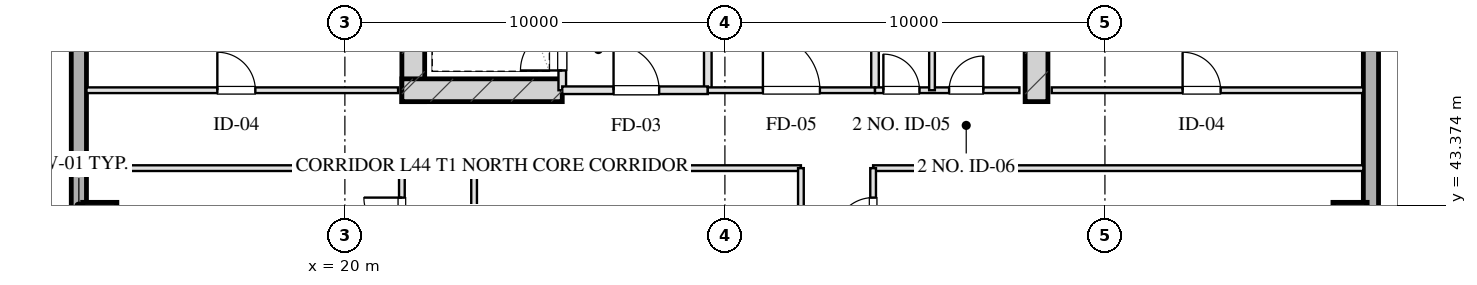
"""IFC4 building model, lengths in metres.
Left out: names, types, materials, properties, quantities, classifications, styles, units other than length and angle.
Written with IfcOpenShell. Run it as: python <this file> out.ifc"""

import sys

from ifc_helpers import new_model, si_unit, direction, frame, frame_2d, origin, origin_2d, place, context, subcontext, project, spatial, rectangle, hollow_rectangle, extrude, element, fill, save


model = new_model("IFC4")
c1 = context("Model", 3, precision=1e-05, world=origin(), true_north=direction((0.0, 1.0)))
c2 = subcontext(c1, "Body", "Model", "MODEL_VIEW")
j1 = project(units=[si_unit("LENGTHUNIT", "METRE"), si_unit("PLANEANGLEUNIT", "RADIAN")], contexts=[c1])
p1 = place(None, origin())
s1 = spatial("IfcSite", under=j1, at=p1, CompositionType="ELEMENT")
p2 = place(p1, origin())
s2 = spatial("IfcBuilding", under=s1, at=p2, CompositionType="ELEMENT")
p3 = place(p2, frame((0.0, 0.0, 166.75)))
s3 = spatial("IfcBuildingStorey", under=s2, at=p3, CompositionType="ELEMENT", Elevation=166.75)
for number, where, z_axis, x_axis in (
    (1, (21.8, 46.1, 0.0), (0.0, 0.0, 1.0), (0.0, 1.0, 0.0)),
    (2, (38.2, 46.1, 0.0), (0.0, 0.0, 1.0), (0.0, 1.0, 0.0)),
):
    element("IfcWall", number, at=place(p3, frame(where, z_axis=z_axis, x_axis=x_axis)), inside=s3, PredefinedType="SHEAR", context=c2, shape_type="SweptSolid", body=[
        extrude(rectangle(XDim=9.48, YDim=0.6, at=frame_2d((4.74, 0.0))), origin(), (0.0, 0.0, 1.0), 3.45),
    ])
p4 = place(p3, frame((21.5, 46.4, 0.0), z_axis=(0.0, 0.0, 1.0), x_axis=(1.0, 0.0, 0.0)))
e3 = element("IfcWall", 3, at=p4, inside=s3, PredefinedType="SHEAR", context=c2, shape_type="SweptSolid", body=[
    extrude(rectangle(XDim=4.22, YDim=0.6, at=frame_2d((2.11, 0.0))), origin(), (0.0, 0.0, 1.0), 3.45),
])
for number, where, z_axis, x_axis in (
    (4, (13.55, 43.0, 0.0), (0.0, 0.0, 1.0), (1.0, 0.0, 0.0)),
    (5, (46.45, 43.0, 0.0), (0.0, 0.0, 1.0), (1.0, 0.0, 0.0)),
):
    element("IfcColumn", number, at=place(p3, frame(where, z_axis=z_axis, x_axis=x_axis)), inside=s3, PredefinedType="COLUMN", context=c2, shape_type="SweptSolid", body=[
        extrude(hollow_rectangle(XDim=0.9, YDim=0.9, WallThickness=0.032, at=origin_2d()), origin(), (0.0, 0.0, 1.0), 3.451),
    ])
p5 = place(p3, frame((13.0, 10.8, 0.0), z_axis=(0.0, 0.0, 1.0), x_axis=(0.0, 1.0, 0.0)))
e6 = element("IfcWall", 6, at=p5, inside=s3, PredefinedType="SOLIDWALL", context=c2, shape_type="SweptSolid", body=[
    extrude(rectangle(XDim=46.4, YDim=0.4, at=frame_2d((23.2, 0.0))), origin(), (0.0, 0.0, 1.0), 2.61),
])
p6 = place(p5, frame((16.85, 0.0, 0.0)))
e7 = element("IfcOpeningElement", 7, at=p6, cuts=e6, PredefinedType="OPENING", context=c2, shape_type="SweptSolid", body=[
    extrude(rectangle(XDim=1.1, YDim=2.15, at=frame_2d((0.55, 1.075))), frame((0.0, 0.21, 0.0), z_axis=(0.0, -1.0, 0.0), x_axis=(1.0, 0.0, 0.0)), (0.0, 0.0, 1.0), 0.42),
])
p7 = place(p3, frame((47.0, 57.2, 0.0), z_axis=(0.0, 0.0, 1.0), x_axis=(0.0, -1.0, 0.0)))
e8 = element("IfcWall", 8, at=p7, inside=s3, PredefinedType="SOLIDWALL", context=c2, shape_type="SweptSolid", body=[
    extrude(rectangle(XDim=46.4, YDim=0.4, at=frame_2d((23.2, 0.0))), origin(), (0.0, 0.0, 1.0), 2.61),
])
p8 = place(p7, frame((25.596, 0.0, 0.0)))
e9 = element("IfcOpeningElement", 9, at=p8, cuts=e8, PredefinedType="OPENING", context=c2, shape_type="SweptSolid", body=[
    extrude(rectangle(XDim=1.1, YDim=2.15, at=frame_2d((0.55, 1.075))), frame((0.0, 0.21, 0.0), z_axis=(0.0, -1.0, 0.0), x_axis=(1.0, 0.0, 0.0)), (0.0, 0.0, 1.0), 0.42),
])
p9 = place(p3, frame((25.72, 46.4, 0.0), z_axis=(0.0, 0.0, 1.0), x_axis=(0.0, 1.0, 0.0)))
e10 = element("IfcWall", 10, at=p9, inside=s3, PredefinedType="PARTITIONING", context=c2, shape_type="SweptSolid", body=[
    extrude(rectangle(XDim=1.9, YDim=0.2, at=frame_2d((0.95, 0.0))), origin(), (0.0, 0.0, 1.0), 3.175),
])
p10 = place(p9, frame((0.52, 0.0, 0.0)))
e11 = element("IfcOpeningElement", 11, at=p10, cuts=e10, PredefinedType="OPENING", context=c2, shape_type="SweptSolid", body=[
    extrude(rectangle(XDim=1.1, YDim=2.05, at=frame_2d((0.55, 1.025))), frame((0.0, 0.11, 0.0), z_axis=(0.0, -1.0, 0.0), x_axis=(1.0, 0.0, 0.0)), (0.0, 0.0, 1.0), 0.22),
])
p11 = place(p3, frame((29.55, 46.4, 0.0), z_axis=(0.0, 0.0, 1.0), x_axis=(0.0, 1.0, 0.0)))
e12 = element("IfcWall", 12, at=p11, inside=s3, PredefinedType="PARTITIONING", context=c2, shape_type="SweptSolid", body=[
    extrude(rectangle(XDim=8.43, YDim=0.2, at=frame_2d((4.215, 0.0))), origin(), (0.0, 0.0, 1.0), 3.175),
])
p12 = place(p3, frame((25.72, 46.4, 0.0), z_axis=(0.0, 0.0, 1.0), x_axis=(1.0, 0.0, 0.0)))
e13 = element("IfcWall", 13, at=p12, inside=s3, PredefinedType="PARTITIONING", context=c2, shape_type="SweptSolid", body=[
    extrude(rectangle(XDim=3.83, YDim=0.2, at=frame_2d((1.915, 0.0))), origin(), (0.0, 0.0, 1.0), 3.175),
])
p13 = place(p12, frame((1.35, 0.0, 0.0)))
e14 = element("IfcOpeningElement", 14, at=p13, cuts=e13, PredefinedType="OPENING", context=c2, shape_type="SweptSolid", body=[
    extrude(rectangle(XDim=1.2, YDim=2.05, at=frame_2d((0.6, 1.025))), frame((0.0, 0.11, 0.0), z_axis=(0.0, -1.0, 0.0), x_axis=(1.0, 0.0, 0.0)), (0.0, 0.0, 1.0), 0.22),
])
p14 = place(p3, frame((33.95, 46.4, 0.0), z_axis=(0.0, 0.0, 1.0), x_axis=(0.0, 1.0, 0.0)))
e15 = element("IfcWall", 15, at=p14, inside=s3, PredefinedType="PARTITIONING", context=c2, shape_type="SweptSolid", body=[
    extrude(rectangle(XDim=8.43, YDim=0.2, at=frame_2d((4.215, 0.0))), origin(), (0.0, 0.0, 1.0), 3.175),
])
p15 = place(p3, frame((29.55, 46.4, 0.0), z_axis=(0.0, 0.0, 1.0), x_axis=(1.0, 0.0, 0.0)))
e16 = element("IfcWall", 16, at=p15, inside=s3, PredefinedType="PARTITIONING", context=c2, shape_type="SweptSolid", body=[
    extrude(rectangle(XDim=4.4, YDim=0.15, at=frame_2d((2.2, 0.0))), origin(), (0.0, 0.0, 1.0), 3.175),
])
p16 = place(p15, frame((1.45, 0.0, 0.0)))
e17 = element("IfcOpeningElement", 17, at=p16, cuts=e16, PredefinedType="OPENING", context=c2, shape_type="SweptSolid", body=[
    extrude(rectangle(XDim=1.5, YDim=2.05, at=frame_2d((0.75, 1.025))), frame((0.0, 0.085, 0.0), z_axis=(0.0, -1.0, 0.0), x_axis=(1.0, 0.0, 0.0)), (0.0, 0.0, 1.0), 0.17),
])
p17 = place(p3, frame((33.95, 46.4, 0.0), z_axis=(0.0, 0.0, 1.0), x_axis=(1.0, 0.0, 0.0)))
e18 = element("IfcWall", 18, at=p17, inside=s3, PredefinedType="PARTITIONING", context=c2, shape_type="SweptSolid", body=[
    extrude(rectangle(XDim=3.8, YDim=0.15, at=frame_2d((1.9, 0.0))), origin(), (0.0, 0.0, 1.0), 3.175),
])
p18 = place(p17, frame((0.22, 0.0, 0.0)))
e19 = element("IfcOpeningElement", 19, at=p18, cuts=e18, PredefinedType="OPENING", context=c2, shape_type="SweptSolid", body=[
    extrude(rectangle(XDim=0.95, YDim=2.05, at=frame_2d((0.475, 1.025))), frame((0.0, 0.085, 0.0), z_axis=(0.0, -1.0, 0.0), x_axis=(1.0, 0.0, 0.0)), (0.0, 0.0, 1.0), 0.17),
])
p19 = place(p17, frame((1.95, 0.0, 0.0)))
e20 = element("IfcOpeningElement", 20, at=p19, cuts=e18, PredefinedType="OPENING", context=c2, shape_type="SweptSolid", body=[
    extrude(rectangle(XDim=0.9, YDim=2.05, at=frame_2d((0.45, 1.025))), frame((0.0, 0.085, 0.0), z_axis=(0.0, -1.0, 0.0), x_axis=(1.0, 0.0, 0.0)), (0.0, 0.0, 1.0), 0.17),
])
p20 = place(p3, frame((35.45, 46.4, 0.0), z_axis=(0.0, 0.0, 1.0), x_axis=(0.0, 1.0, 0.0)))
e21 = element("IfcWall", 21, at=p20, inside=s3, PredefinedType="PARTITIONING", context=c2, shape_type="SweptSolid", body=[
    extrude(rectangle(XDim=8.43, YDim=0.15, at=frame_2d((4.215, 0.0))), origin(), (0.0, 0.0, 1.0), 2.765),
])
p21 = place(p20, frame((2.55, 0.0, 0.0)))
e22 = element("IfcOpeningElement", 22, at=p21, cuts=e21, PredefinedType="OPENING", context=c2, shape_type="SweptSolid", body=[
    extrude(rectangle(XDim=0.95, YDim=2.05, at=frame_2d((0.475, 1.025))), frame((0.0, 0.085, 0.0), z_axis=(0.0, -1.0, 0.0), x_axis=(1.0, 0.0, 0.0)), (0.0, 0.0, 1.0), 0.17),
])
p22 = place(p20, frame((5.6, 0.0, 0.0)))
e23 = element("IfcOpeningElement", 23, at=p22, cuts=e21, PredefinedType="OPENING", context=c2, shape_type="SweptSolid", body=[
    extrude(rectangle(XDim=0.9, YDim=2.05, at=frame_2d((0.45, 1.025))), frame((0.0, 0.085, 0.0), z_axis=(0.0, -1.0, 0.0), x_axis=(1.0, 0.0, 0.0)), (0.0, 0.0, 1.0), 0.17),
])
p23 = place(p3, frame((13.2, 46.4, 0.0), z_axis=(0.0, 0.0, 1.0), x_axis=(1.0, 0.0, 0.0)))
e24 = element("IfcWall", 24, at=p23, inside=s3, PredefinedType="PARTITIONING", context=c2, shape_type="SweptSolid", body=[
    extrude(rectangle(XDim=8.2, YDim=0.15, at=frame_2d((4.1, 0.0))), origin(), (0.0, 0.0, 1.0), 3.175),
])
p24 = place(p23, frame((3.444, 0.0, 0.0)))
e25 = element("IfcOpeningElement", 25, at=p24, cuts=e24, PredefinedType="OPENING", context=c2, shape_type="SweptSolid", body=[
    extrude(rectangle(XDim=1.0, YDim=2.05, at=frame_2d((0.5, 1.025))), frame((0.0, 0.085, 0.0), z_axis=(0.0, -1.0, 0.0), x_axis=(1.0, 0.0, 0.0)), (0.0, 0.0, 1.0), 0.17),
])
p25 = place(p3, frame((38.6, 46.4, 0.0), z_axis=(0.0, 0.0, 1.0), x_axis=(1.0, 0.0, 0.0)))
e26 = element("IfcWall", 26, at=p25, inside=s3, PredefinedType="PARTITIONING", context=c2, shape_type="SweptSolid", body=[
    extrude(rectangle(XDim=8.2, YDim=0.15, at=frame_2d((4.1, 0.0))), origin(), (0.0, 0.0, 1.0), 3.175),
])
p26 = place(p25, frame((3.444, 0.0, 0.0)))
e27 = element("IfcOpeningElement", 27, at=p26, cuts=e26, PredefinedType="OPENING", context=c2, shape_type="SweptSolid", body=[
    extrude(rectangle(XDim=1.0, YDim=2.05, at=frame_2d((0.5, 1.025))), frame((0.0, 0.085, 0.0), z_axis=(0.0, -1.0, 0.0), x_axis=(1.0, 0.0, 0.0)), (0.0, 0.0, 1.0), 0.17),
])
p27 = place(p3, frame((13.2, 44.35, 0.0), z_axis=(0.0, 0.0, 1.0), x_axis=(1.0, 0.0, 0.0)))
e28 = element("IfcWall", 28, at=p27, inside=s3, PredefinedType="PARTITIONING", context=c2, shape_type="SweptSolid", body=[
    extrude(rectangle(XDim=8.3, YDim=0.15, at=frame_2d((4.15, 0.0))), origin(), (0.0, 0.0, 1.0), 3.175),
])
p28 = place(p3, frame((23.4, 44.35, 0.0), z_axis=(0.0, 0.0, 1.0), x_axis=(1.0, 0.0, 0.0)))
e29 = element("IfcWall", 29, at=p28, inside=s3, PredefinedType="PARTITIONING", context=c2, shape_type="SweptSolid", body=[
    extrude(rectangle(XDim=8.6, YDim=0.15, at=frame_2d((4.3, 0.0))), origin(), (0.0, 0.0, 1.0), 3.175),
])
p29 = place(p3, frame((33.9, 44.35, 0.0), z_axis=(0.0, 0.0, 1.0), x_axis=(1.0, 0.0, 0.0)))
e30 = element("IfcWall", 30, at=p29, inside=s3, PredefinedType="PARTITIONING", context=c2, shape_type="SweptSolid", body=[
    extrude(rectangle(XDim=12.9, YDim=0.15, at=frame_2d((6.45, 0.0))), origin(), (0.0, 0.0, 1.0), 3.175),
])
p30 = place(p3, frame((21.5, 23.65, 0.0), z_axis=(0.0, 0.0, 1.0), x_axis=(0.0, 1.0, 0.0)))
e31 = element("IfcWall", 31, at=p30, inside=s3, PredefinedType="PARTITIONING", context=c2, shape_type="SweptSolid", body=[
    extrude(rectangle(XDim=20.7, YDim=0.15, at=frame_2d((10.35, 0.0))), origin(), (0.0, 0.0, 1.0), 3.175),
])
p31 = place(p30, frame((0.775, 0.0, 0.0)))
e32 = element("IfcOpeningElement", 32, at=p31, cuts=e31, PredefinedType="OPENING", context=c2, shape_type="SweptSolid", body=[
    extrude(rectangle(XDim=1.0, YDim=2.05, at=frame_2d((0.5, 1.025))), frame((0.0, 0.085, 0.0), z_axis=(0.0, -1.0, 0.0), x_axis=(1.0, 0.0, 0.0)), (0.0, 0.0, 1.0), 0.17),
])
p32 = place(p30, frame((3.95, 0.0, 0.0)))
e33 = element("IfcOpeningElement", 33, at=p32, cuts=e31, PredefinedType="OPENING", context=c2, shape_type="SweptSolid", body=[
    extrude(rectangle(XDim=1.0, YDim=2.05, at=frame_2d((0.5, 1.025))), frame((0.0, 0.085, 0.0), z_axis=(0.0, -1.0, 0.0), x_axis=(1.0, 0.0, 0.0)), (0.0, 0.0, 1.0), 0.17),
])
p33 = place(p30, frame((7.51, 0.0, 0.0)))
e34 = element("IfcOpeningElement", 34, at=p33, cuts=e31, PredefinedType="OPENING", context=c2, shape_type="SweptSolid", body=[
    extrude(rectangle(XDim=1.0, YDim=2.05, at=frame_2d((0.5, 1.025))), frame((0.0, 0.085, 0.0), z_axis=(0.0, -1.0, 0.0), x_axis=(1.0, 0.0, 0.0)), (0.0, 0.0, 1.0), 0.17),
])
p34 = place(p30, frame((11.51, 0.0, 0.0)))
e35 = element("IfcOpeningElement", 35, at=p34, cuts=e31, PredefinedType="OPENING", context=c2, shape_type="SweptSolid", body=[
    extrude(rectangle(XDim=1.05, YDim=2.05, at=frame_2d((0.525, 1.025))), frame((0.0, 0.085, 0.0), z_axis=(0.0, -1.0, 0.0), x_axis=(1.0, 0.0, 0.0)), (0.0, 0.0, 1.0), 0.17),
])
p35 = place(p30, frame((15.75, 0.0, 0.0)))
e36 = element("IfcOpeningElement", 36, at=p35, cuts=e31, PredefinedType="OPENING", context=c2, shape_type="SweptSolid", body=[
    extrude(rectangle(XDim=0.85, YDim=2.05, at=frame_2d((0.425, 1.025))), frame((0.0, 0.085, 0.0), z_axis=(0.0, -1.0, 0.0), x_axis=(1.0, 0.0, 0.0)), (0.0, 0.0, 1.0), 0.17),
])
p36 = place(p30, frame((18.925, 0.0, 0.0)))
e37 = element("IfcOpeningElement", 37, at=p36, cuts=e31, PredefinedType="OPENING", context=c2, shape_type="SweptSolid", body=[
    extrude(rectangle(XDim=1.0, YDim=2.05, at=frame_2d((0.5, 1.025))), frame((0.0, 0.085, 0.0), z_axis=(0.0, -1.0, 0.0), x_axis=(1.0, 0.0, 0.0)), (0.0, 0.0, 1.0), 0.17),
])
p37 = place(p3, frame((23.4, 23.65, 0.0), z_axis=(0.0, 0.0, 1.0), x_axis=(0.0, 1.0, 0.0)))
e38 = element("IfcWall", 38, at=p37, inside=s3, PredefinedType="PARTITIONING", context=c2, shape_type="SweptSolid", body=[
    extrude(rectangle(XDim=20.7, YDim=0.15, at=frame_2d((10.35, 0.0))), origin(), (0.0, 0.0, 1.0), 3.175),
])
p38 = place(p37, frame((4.117, 0.0, 0.0)))
e39 = element("IfcOpeningElement", 39, at=p38, cuts=e38, PredefinedType="OPENING", context=c2, shape_type="SweptSolid", body=[
    extrude(rectangle(XDim=1.1, YDim=2.05, at=frame_2d((0.55, 1.025))), frame((0.0, 0.085, 0.0), z_axis=(0.0, -1.0, 0.0), x_axis=(1.0, 0.0, 0.0)), (0.0, 0.0, 1.0), 0.17),
])
p39 = place(p37, frame((14.347, 0.0, 0.0)))
e40 = element("IfcOpeningElement", 40, at=p39, cuts=e38, PredefinedType="OPENING", context=c2, shape_type="SweptSolid", body=[
    extrude(rectangle(XDim=1.1, YDim=2.05, at=frame_2d((0.55, 1.025))), frame((0.0, 0.085, 0.0), z_axis=(0.0, -1.0, 0.0), x_axis=(1.0, 0.0, 0.0)), (0.0, 0.0, 1.0), 0.17),
])
p40 = place(p3, frame((32.0, 23.65, 0.0), z_axis=(0.0, 0.0, 1.0), x_axis=(0.0, 1.0, 0.0)))
e41 = element("IfcWall", 41, at=p40, inside=s3, PredefinedType="PARTITIONING", context=c2, shape_type="SweptSolid", body=[
    extrude(rectangle(XDim=20.7, YDim=0.15, at=frame_2d((10.35, 0.0))), origin(), (0.0, 0.0, 1.0), 3.175),
])
p41 = place(p3, frame((33.9, 23.65, 0.0), z_axis=(0.0, 0.0, 1.0), x_axis=(0.0, 1.0, 0.0)))
e42 = element("IfcWall", 42, at=p41, inside=s3, PredefinedType="PARTITIONING", context=c2, shape_type="SweptSolid", body=[
    extrude(rectangle(XDim=20.7, YDim=0.15, at=frame_2d((10.35, 0.0))), origin(), (0.0, 0.0, 1.0), 3.175),
])
p42 = place(p41, frame((2.329, 0.0, 0.0)))
e43 = element("IfcOpeningElement", 43, at=p42, cuts=e42, PredefinedType="OPENING", context=c2, shape_type="SweptSolid", body=[
    extrude(rectangle(XDim=1.0, YDim=2.05, at=frame_2d((0.5, 1.025))), frame((0.0, 0.085, 0.0), z_axis=(0.0, -1.0, 0.0), x_axis=(1.0, 0.0, 0.0)), (0.0, 0.0, 1.0), 0.17),
])
p43 = place(p41, frame((8.104, 0.0, 0.0)))
e44 = element("IfcOpeningElement", 44, at=p43, cuts=e42, PredefinedType="OPENING", context=c2, shape_type="SweptSolid", body=[
    extrude(rectangle(XDim=1.0, YDim=2.05, at=frame_2d((0.5, 1.025))), frame((0.0, 0.085, 0.0), z_axis=(0.0, -1.0, 0.0), x_axis=(1.0, 0.0, 0.0)), (0.0, 0.0, 1.0), 0.17),
])
p44 = place(p41, frame((14.35, 0.0, 0.0)))
e45 = element("IfcOpeningElement", 45, at=p44, cuts=e42, PredefinedType="OPENING", context=c2, shape_type="SweptSolid", body=[
    extrude(rectangle(XDim=1.05, YDim=2.05, at=frame_2d((0.525, 1.025))), frame((0.0, 0.085, 0.0), z_axis=(0.0, -1.0, 0.0), x_axis=(1.0, 0.0, 0.0)), (0.0, 0.0, 1.0), 0.17),
])
p45 = place(p41, frame((18.925, 0.0, 0.0)))
e46 = element("IfcOpeningElement", 46, at=p45, cuts=e42, PredefinedType="OPENING", context=c2, shape_type="SweptSolid", body=[
    extrude(rectangle(XDim=1.0, YDim=2.05, at=frame_2d((0.5, 1.025))), frame((0.0, 0.085, 0.0), z_axis=(0.0, -1.0, 0.0), x_axis=(1.0, 0.0, 0.0)), (0.0, 0.0, 1.0), 0.17),
])
p46 = place(p10, origin())
e47 = element("IfcDoor", 47, at=p46, inside=s3, OperationType="SINGLE_SWING_LEFT", PredefinedType="DOOR", context=c2, shape_type="SweptSolid", body=[
    extrude(rectangle(XDim=1.1, YDim=2.05, at=frame_2d((0.55, 1.025))), frame((0.0, 0.025, 0.0), z_axis=(0.0, -1.0, 0.0), x_axis=(1.0, 0.0, 0.0)), (0.0, 0.0, 1.0), 0.05),
])
fill(e11, e47)
p47 = place(p13, origin())
e48 = element("IfcDoor", 48, at=p47, inside=s3, OperationType="SINGLE_SWING_LEFT", PredefinedType="DOOR", context=c2, shape_type="SweptSolid", body=[
    extrude(rectangle(XDim=1.2, YDim=2.05, at=frame_2d((0.6, 1.025))), frame((0.0, 0.025, 0.0), z_axis=(0.0, -1.0, 0.0), x_axis=(1.0, 0.0, 0.0)), (0.0, 0.0, 1.0), 0.05),
])
fill(e14, e48)
p48 = place(p16, origin())
e49 = element("IfcDoor", 49, at=p48, inside=s3, OperationType="SINGLE_SWING_LEFT", PredefinedType="DOOR", context=c2, shape_type="SweptSolid", body=[
    extrude(rectangle(XDim=1.5, YDim=2.05, at=frame_2d((0.75, 1.025))), frame((0.0, 0.025, 0.0), z_axis=(0.0, -1.0, 0.0), x_axis=(1.0, 0.0, 0.0)), (0.0, 0.0, 1.0), 0.05),
])
fill(e17, e49)
p49 = place(p18, origin())
e50 = element("IfcDoor", 50, at=p49, inside=s3, OperationType="SINGLE_SWING_LEFT", PredefinedType="DOOR", context=c2, shape_type="SweptSolid", body=[
    extrude(rectangle(XDim=0.95, YDim=2.05, at=frame_2d((0.475, 1.025))), frame((0.0, 0.025, 0.0), z_axis=(0.0, -1.0, 0.0), x_axis=(1.0, 0.0, 0.0)), (0.0, 0.0, 1.0), 0.05),
])
fill(e19, e50)
p50 = place(p19, origin())
e51 = element("IfcDoor", 51, at=p50, inside=s3, OperationType="SINGLE_SWING_RIGHT", PredefinedType="DOOR", context=c2, shape_type="SweptSolid", body=[
    extrude(rectangle(XDim=0.9, YDim=2.05, at=frame_2d((0.45, 1.025))), frame((0.0, 0.025, 0.0), z_axis=(0.0, -1.0, 0.0), x_axis=(1.0, 0.0, 0.0)), (0.0, 0.0, 1.0), 0.05),
])
fill(e20, e51)
p51 = place(p24, origin())
e52 = element("IfcDoor", 52, at=p51, inside=s3, OperationType="SINGLE_SWING_LEFT", PredefinedType="DOOR", context=c2, shape_type="SweptSolid", body=[
    extrude(rectangle(XDim=1.0, YDim=2.05, at=frame_2d((0.5, 1.025))), frame((0.0, 0.025, 0.0), z_axis=(0.0, -1.0, 0.0), x_axis=(1.0, 0.0, 0.0)), (0.0, 0.0, 1.0), 0.05),
])
fill(e25, e52)
p52 = place(p26, origin())
e53 = element("IfcDoor", 53, at=p52, inside=s3, OperationType="SINGLE_SWING_LEFT", PredefinedType="DOOR", context=c2, shape_type="SweptSolid", body=[
    extrude(rectangle(XDim=1.0, YDim=2.05, at=frame_2d((0.5, 1.025))), frame((0.0, 0.025, 0.0), z_axis=(0.0, -1.0, 0.0), x_axis=(1.0, 0.0, 0.0)), (0.0, 0.0, 1.0), 0.05),
])
fill(e27, e53)
p53 = place(p36, origin())
e54 = element("IfcDoor", 54, at=p53, inside=s3, OperationType="SINGLE_SWING_RIGHT", PredefinedType="DOOR", context=c2, shape_type="SweptSolid", body=[
    extrude(rectangle(XDim=1.0, YDim=2.05, at=frame_2d((0.5, 1.025))), frame((0.0, 0.025, 0.0), z_axis=(0.0, -1.0, 0.0), x_axis=(1.0, 0.0, 0.0)), (0.0, 0.0, 1.0), 0.05),
])
fill(e37, e54)
p54 = place(p45, origin())
e55 = element("IfcDoor", 55, at=p54, inside=s3, OperationType="SINGLE_SWING_LEFT", PredefinedType="DOOR", context=c2, shape_type="SweptSolid", body=[
    extrude(rectangle(XDim=1.0, YDim=2.05, at=frame_2d((0.5, 1.025))), frame((0.0, 0.025, 0.0), z_axis=(0.0, -1.0, 0.0), x_axis=(1.0, 0.0, 0.0)), (0.0, 0.0, 1.0), 0.05),
])
fill(e46, e55)
save(model, sys.argv[1])
